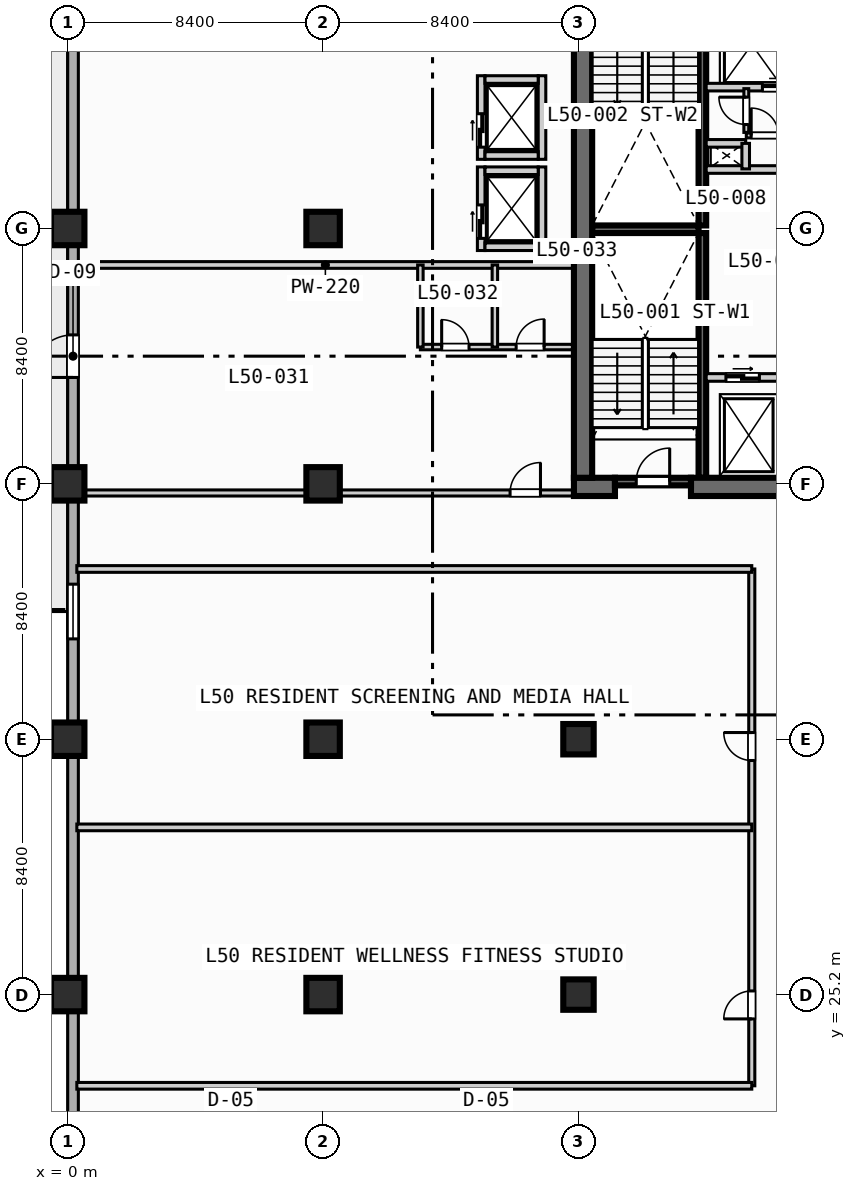
"""IFC4 building model, lengths in metres.
Left out: names, types, materials, properties, quantities, classifications, styles, units other than length and angle.
Written with IfcOpenShell. Run it as: python <this file> out.ifc"""

import sys

from ifc_helpers import new_model, si_unit, direction, frame, frame_2d, origin, origin_2d, place, context, subcontext, project, spatial, rectangle, extrude, element, fill, save


model = new_model("IFC4")
c1 = context("Model", 3, precision=1e-05, world=origin(), true_north=direction((0.0, 1.0)))
c2 = subcontext(c1, "Body", "Model", "MODEL_VIEW")
j1 = project(units=[si_unit("LENGTHUNIT", "METRE"), si_unit("PLANEANGLEUNIT", "RADIAN")], contexts=[c1])
p1 = place(None, origin())
s1 = spatial("IfcSite", under=j1, at=p1, CompositionType="ELEMENT")
p2 = place(p1, origin())
s2 = spatial("IfcBuilding", under=s1, at=p2, CompositionType="ELEMENT")
p3 = place(p2, frame((0.0, 0.0, 205.0)))
s3 = spatial("IfcBuildingStorey", under=s2, at=p3, CompositionType="ELEMENT", Elevation=205.0)
for number, where, z_axis, x_axis in (
    (1, (20.875, 42.2, 0.0), (0.0, 0.0, 1.0), (0.0, 1.0, 0.0)),
    (2, (20.875, 50.5, 0.0), (0.0, 0.0, 1.0), (0.0, 1.0, 0.0)),
):
    element("IfcWall", number, at=place(p3, frame(where, z_axis=z_axis, x_axis=x_axis)), inside=s3, PredefinedType="SOLIDWALL", context=c2, shape_type="SweptSolid", body=[
        extrude(rectangle(XDim=8.05, YDim=0.25, at=frame_2d((4.025, 0.0))), origin(), (0.0, 0.0, 1.0), 3.47),
    ])
p4 = place(p3, frame((17.25, 50.375, 0.0), z_axis=(0.0, 0.0, 1.0), x_axis=(1.0, 0.0, 0.0)))
e3 = element("IfcWall", 3, at=p4, inside=s3, PredefinedType="SOLIDWALL", context=c2, shape_type="SweptSolid", body=[
    extrude(rectangle(XDim=3.5, YDim=0.25, at=frame_2d((1.75, 0.0))), origin(), (0.0, 0.0, 1.0), 3.47),
])
p5 = place(p3, frame((16.65, 41.9, 0.0), z_axis=(0.0, 0.0, 1.0), x_axis=(1.0, 0.0, 0.0)))
e4 = element("IfcWall", 4, at=p5, inside=s3, PredefinedType="SHEAR", context=c2, shape_type="SweptSolid", body=[
    extrude(rectangle(XDim=1.35, YDim=0.6, at=frame_2d((0.675, 0.0))), origin(), (0.0, 0.0, 1.0), 3.47),
])
p6 = place(p3, frame((20.5, 41.9, 0.0), z_axis=(0.0, 0.0, 1.0), x_axis=(1.0, 0.0, 0.0)))
e5 = element("IfcWall", 5, at=p6, inside=s3, PredefinedType="SHEAR", context=c2, shape_type="SweptSolid", body=[
    extrude(rectangle(XDim=5.0, YDim=0.6, at=frame_2d((2.5, 0.0))), origin(), (0.0, 0.0, 1.0), 3.47),
])
p7 = place(p3, frame((16.95, 42.2, 0.0), z_axis=(0.0, 0.0, 1.0), x_axis=(0.0, 1.0, 0.0)))
e6 = element("IfcWall", 6, at=p7, inside=s3, PredefinedType="SHEAR", context=c2, shape_type="SweptSolid", body=[
    extrude(rectangle(XDim=16.35, YDim=0.6, at=frame_2d((8.175, 0.0))), origin(), (0.0, 0.0, 1.0), 3.47),
])
for number, where, z_axis, x_axis in (
    (7, (0.0, 25.2, 0.0), (0.0, 0.0, 1.0), (1.0, 0.0, 0.0)),
    (8, (0.0, 33.6, 0.0), (0.0, 0.0, 1.0), (1.0, 0.0, 0.0)),
    (9, (0.0, 42.0, 0.0), (0.0, 0.0, 1.0), (1.0, 0.0, 0.0)),
    (10, (0.0, 50.4, 0.0), (0.0, 0.0, 1.0), (1.0, 0.0, 0.0)),
    (11, (8.4, 25.2, 0.0), (0.0, 0.0, 1.0), (1.0, 0.0, 0.0)),
    (12, (8.4, 33.6, 0.0), (0.0, 0.0, 1.0), (1.0, 0.0, 0.0)),
    (13, (8.4, 42.0, 0.0), (0.0, 0.0, 1.0), (1.0, 0.0, 0.0)),
    (14, (8.4, 50.4, 0.0), (0.0, 0.0, 1.0), (1.0, 0.0, 0.0)),
):
    element("IfcColumn", number, at=place(p3, frame(where, z_axis=z_axis, x_axis=x_axis)), inside=s3, PredefinedType="COLUMN", context=c2, shape_type="SweptSolid", body=[
        extrude(rectangle(XDim=1.1, YDim=1.1, at=origin_2d()), origin(), (0.0, 0.0, 1.0), 3.7),
    ])
for number, where, z_axis, x_axis in (
    (15, (16.8, 25.2, 0.0), (0.0, 0.0, 1.0), (1.0, 0.0, 0.0)),
    (16, (16.8, 33.6, 0.0), (0.0, 0.0, 1.0), (1.0, 0.0, 0.0)),
):
    element("IfcColumn", number, at=place(p3, frame(where, z_axis=z_axis, x_axis=x_axis)), inside=s3, PredefinedType="COLUMN", context=c2, shape_type="SweptSolid", body=[
        extrude(rectangle(XDim=1.0, YDim=1.0, at=origin_2d()), origin(), (0.0, 0.0, 1.0), 3.7),
    ])
p8 = place(p3, frame((0.175, 3.175, 0.0), z_axis=(0.0, 0.0, 1.0), x_axis=(0.0, 1.0, 0.0)))
e17 = element("IfcWall", 17, at=p8, inside=s3, PredefinedType="STANDARD", context=c2, shape_type="SweptSolid", body=[
    extrude(rectangle(XDim=69.25, YDim=0.35, at=frame_2d((34.625, 0.0))), origin(), (0.0, 0.0, 1.0), 3.47),
])
p9 = place(p8, frame((42.325, 0.0, 0.0)))
e18 = element("IfcOpeningElement", 18, at=p9, cuts=e17, PredefinedType="OPENING", context=c2, shape_type="SweptSolid", body=[
    extrude(rectangle(XDim=1.4, YDim=2.2, at=frame_2d((0.7, 1.1))), frame((0.0, 0.185, 0.0), z_axis=(0.0, -1.0, 0.0), x_axis=(1.0, 0.0, 0.0)), (0.0, 0.0, 1.0), 0.37),
])
p10 = place(p8, frame((33.725, 0.0, 0.85)))
e19 = element("IfcOpeningElement", 19, at=p10, cuts=e17, PredefinedType="OPENING", context=c2, shape_type="SweptSolid", body=[
    extrude(rectangle(XDim=1.8, YDim=1.8, at=frame_2d((0.9, 0.9))), frame((0.0, 0.185, 0.0), z_axis=(0.0, -1.0, 0.0), x_axis=(1.0, 0.0, 0.0)), (0.0, 0.0, 1.0), 0.37),
])
p11 = place(p3, frame((18.0, 42.075, 0.0), z_axis=(0.0, 0.0, 1.0), x_axis=(1.0, 0.0, 0.0)))
e20 = element("IfcWall", 20, at=p11, inside=s3, PredefinedType="SOLIDWALL", context=c2, shape_type="SweptSolid", body=[
    extrude(rectangle(XDim=2.5, YDim=0.25, at=frame_2d((1.25, 0.0))), origin(), (0.0, 0.0, 1.0), 3.47),
])
p12 = place(p11, frame((0.7, 0.0, 0.0)))
e21 = element("IfcOpeningElement", 21, at=p12, cuts=e20, PredefinedType="OPENING", context=c2, shape_type="SweptSolid", body=[
    extrude(rectangle(XDim=1.1, YDim=2.15, at=frame_2d((0.55, 1.075))), frame((0.0, 0.135, 0.0), z_axis=(0.0, -1.0, 0.0), x_axis=(1.0, 0.0, 0.0)), (0.0, 0.0, 1.0), 0.27),
])
p13 = place(p3, frame((21.0, 45.5, 0.0), z_axis=(0.0, 0.0, 1.0), x_axis=(1.0, 0.0, 0.0)))
e22 = element("IfcWall", 22, at=p13, inside=s3, PredefinedType="SOLIDWALL", context=c2, shape_type="SweptSolid", body=[
    extrude(rectangle(XDim=4.15, YDim=0.25, at=frame_2d((2.075, 0.0))), origin(), (0.0, 0.0, 1.0), 3.47),
])
p14 = place(p13, frame((0.65, 0.0, 0.0)))
e23 = element("IfcOpeningElement", 23, at=p14, cuts=e22, PredefinedType="OPENING", context=c2, shape_type="SweptSolid", body=[
    extrude(rectangle(XDim=1.1, YDim=2.15, at=frame_2d((0.55, 1.075))), frame((0.0, 0.135, 0.0), z_axis=(0.0, -1.0, 0.0), x_axis=(1.0, 0.0, 0.0)), (0.0, 0.0, 1.0), 0.27),
])
p15 = place(p3, frame((21.0, 52.34, 0.0), z_axis=(0.0, 0.0, 1.0), x_axis=(1.0, 0.0, 0.0)))
e24 = element("IfcWall", 24, at=p15, inside=s3, PredefinedType="SOLIDWALL", context=c2, shape_type="SweptSolid", body=[
    extrude(rectangle(XDim=3.9, YDim=0.25, at=frame_2d((1.95, 0.0))), origin(), (0.0, 0.0, 1.0), 3.47),
])
p16 = place(p3, frame((21.0, 55.05, 0.0), z_axis=(0.0, 0.0, 1.0), x_axis=(1.0, 0.0, 0.0)))
e25 = element("IfcWall", 25, at=p16, inside=s3, PredefinedType="SOLIDWALL", context=c2, shape_type="SweptSolid", body=[
    extrude(rectangle(XDim=4.15, YDim=0.25, at=frame_2d((2.075, 0.0))), origin(), (0.0, 0.0, 1.0), 3.47),
])
p17 = place(p16, frame((1.85, 0.0, 0.0)))
e26 = element("IfcOpeningElement", 26, at=p17, cuts=e25, PredefinedType="OPENING", context=c2, shape_type="SweptSolid", body=[
    extrude(rectangle(XDim=1.1, YDim=2.15, at=frame_2d((0.55, 1.075))), frame((0.0, 0.135, 0.0), z_axis=(0.0, -1.0, 0.0), x_axis=(1.0, 0.0, 0.0)), (0.0, 0.0, 1.0), 0.27),
])
p18 = place(p3, frame((21.0, 53.2, 0.0), z_axis=(0.0, 0.0, 1.0), x_axis=(1.0, 0.0, 0.0)))
e27 = element("IfcWall", 27, at=p18, inside=s3, PredefinedType="SOLIDWALL", context=c2, shape_type="SweptSolid", body=[
    extrude(rectangle(XDim=1.3, YDim=0.25, at=frame_2d((0.65, 0.0))), origin(), (0.0, 0.0, 1.0), 3.47),
])
p19 = place(p3, frame((22.3, 52.36, 0.0), z_axis=(0.0, 0.0, 1.0), x_axis=(0.0, 1.0, 0.0)))
e28 = element("IfcWall", 28, at=p19, inside=s3, PredefinedType="SOLIDWALL", context=c2, shape_type="SweptSolid", body=[
    extrude(rectangle(XDim=0.84, YDim=0.25, at=frame_2d((0.42, 0.0))), origin(), (0.0, 0.0, 1.0), 3.47),
])
p20 = place(p3, frame((22.32, 53.56, 0.0), z_axis=(0.0, 0.0, 1.0), x_axis=(0.0, 1.0, 0.0)))
e29 = element("IfcWall", 29, at=p20, inside=s3, PredefinedType="PARTITIONING", context=c2, shape_type="SweptSolid", body=[
    extrude(rectangle(XDim=1.44, YDim=0.16, at=frame_2d((0.72, 0.0))), origin(), (0.0, 0.0, 1.0), 3.47),
])
p21 = place(p20, frame((0.26, 0.0, 0.0)))
e30 = element("IfcOpeningElement", 30, at=p21, cuts=e29, PredefinedType="OPENING", context=c2, shape_type="SweptSolid", body=[
    extrude(rectangle(XDim=0.9, YDim=2.1, at=frame_2d((0.45, 1.05))), frame((0.0, 0.09, 0.0), z_axis=(0.0, -1.0, 0.0), x_axis=(1.0, 0.0, 0.0)), (0.0, 0.0, 1.0), 0.18),
])
p22 = place(p3, frame((22.32, 53.46, 0.0), z_axis=(0.0, 0.0, 1.0), x_axis=(1.0, 0.0, 0.0)))
e31 = element("IfcWall", 31, at=p22, inside=s3, PredefinedType="PARTITIONING", context=c2, shape_type="SweptSolid", body=[
    extrude(rectangle(XDim=2.36, YDim=0.16, at=frame_2d((1.18, 0.0))), origin(), (0.0, 0.0, 1.0), 3.47),
])
p23 = place(p22, frame((0.16, 0.0, 0.0)))
e32 = element("IfcOpeningElement", 32, at=p23, cuts=e31, PredefinedType="OPENING", context=c2, shape_type="SweptSolid", body=[
    extrude(rectangle(XDim=0.9, YDim=2.1, at=frame_2d((0.45, 1.05))), frame((0.0, 0.09, 0.0), z_axis=(0.0, -1.0, 0.0), x_axis=(1.0, 0.0, 0.0)), (0.0, 0.0, 1.0), 0.18),
])
p24 = place(p3, frame((13.6, 49.675, 0.0), z_axis=(0.0, 0.0, 1.0), x_axis=(0.0, 1.0, 0.0)))
e33 = element("IfcWall", 33, at=p24, inside=s3, PredefinedType="SOLIDWALL", context=c2, shape_type="SweptSolid", body=[
    extrude(rectangle(XDim=2.75, YDim=0.25, at=frame_2d((1.375, 0.0))), origin(), (0.0, 0.0, 1.0), 3.47),
])
p25 = place(p24, frame((0.4, 0.0, 0.0)))
e34 = element("IfcOpeningElement", 34, at=p25, cuts=e33, PredefinedType="OPENING", context=c2, shape_type="SweptSolid", body=[
    extrude(rectangle(XDim=1.1, YDim=2.15, at=frame_2d((0.55, 1.075))), frame((0.0, 0.135, 0.0), z_axis=(0.0, -1.0, 0.0), x_axis=(1.0, 0.0, 0.0)), (0.0, 0.0, 1.0), 0.27),
])
p26 = place(p3, frame((15.6, 49.675, 0.0), z_axis=(0.0, 0.0, 1.0), x_axis=(0.0, 1.0, 0.0)))
e35 = element("IfcWall", 35, at=p26, inside=s3, PredefinedType="SOLIDWALL", context=c2, shape_type="SweptSolid", body=[
    extrude(rectangle(XDim=2.75, YDim=0.25, at=frame_2d((1.375, 0.0))), origin(), (0.0, 0.0, 1.0), 3.47),
])
for number, where, z_axis, x_axis in (
    (36, (13.725, 49.8, 0.0), (0.0, 0.0, 1.0), (1.0, 0.0, 0.0)),
    (37, (13.725, 52.3, 0.0), (0.0, 0.0, 1.0), (1.0, 0.0, 0.0)),
):
    element("IfcWall", number, at=place(p3, frame(where, z_axis=z_axis, x_axis=x_axis)), inside=s3, PredefinedType="SOLIDWALL", context=c2, shape_type="SweptSolid", body=[
        extrude(rectangle(XDim=1.75, YDim=0.25, at=frame_2d((0.875, 0.0))), origin(), (0.0, 0.0, 1.0), 3.47),
    ])
p27 = place(p3, frame((13.6, 52.675, 0.0), z_axis=(0.0, 0.0, 1.0), x_axis=(0.0, 1.0, 0.0)))
e38 = element("IfcWall", 38, at=p27, inside=s3, PredefinedType="SOLIDWALL", context=c2, shape_type="SweptSolid", body=[
    extrude(rectangle(XDim=2.75, YDim=0.25, at=frame_2d((1.375, 0.0))), origin(), (0.0, 0.0, 1.0), 3.47),
])
p28 = place(p27, frame((0.4, 0.0, 0.0)))
e39 = element("IfcOpeningElement", 39, at=p28, cuts=e38, PredefinedType="OPENING", context=c2, shape_type="SweptSolid", body=[
    extrude(rectangle(XDim=1.1, YDim=2.15, at=frame_2d((0.55, 1.075))), frame((0.0, 0.135, 0.0), z_axis=(0.0, -1.0, 0.0), x_axis=(1.0, 0.0, 0.0)), (0.0, 0.0, 1.0), 0.27),
])
p29 = place(p3, frame((15.6, 52.675, 0.0), z_axis=(0.0, 0.0, 1.0), x_axis=(0.0, 1.0, 0.0)))
e40 = element("IfcWall", 40, at=p29, inside=s3, PredefinedType="SOLIDWALL", context=c2, shape_type="SweptSolid", body=[
    extrude(rectangle(XDim=2.75, YDim=0.25, at=frame_2d((1.375, 0.0))), origin(), (0.0, 0.0, 1.0), 3.47),
])
for number, where, z_axis, x_axis in (
    (41, (13.725, 52.8, 0.0), (0.0, 0.0, 1.0), (1.0, 0.0, 0.0)),
    (42, (13.725, 55.3, 0.0), (0.0, 0.0, 1.0), (1.0, 0.0, 0.0)),
):
    element("IfcWall", number, at=place(p3, frame(where, z_axis=z_axis, x_axis=x_axis)), inside=s3, PredefinedType="SOLIDWALL", context=c2, shape_type="SweptSolid", body=[
        extrude(rectangle(XDim=1.75, YDim=0.25, at=frame_2d((0.875, 0.0))), origin(), (0.0, 0.0, 1.0), 3.47),
    ])
p30 = place(p3, frame((0.35, 41.7, 0.0), z_axis=(0.0, 0.0, 1.0), x_axis=(1.0, 0.0, 0.0)))
e43 = element("IfcWall", 43, at=p30, inside=s3, PredefinedType="PARTITIONING", context=c2, shape_type="SweptSolid", body=[
    extrude(rectangle(XDim=16.25, YDim=0.2, at=frame_2d((8.125, 0.0))), origin(), (0.0, 0.0, 1.0), 2.82),
])
p31 = place(p30, frame((14.2, 0.0, 0.0)))
e44 = element("IfcOpeningElement", 44, at=p31, cuts=e43, PredefinedType="OPENING", context=c2, shape_type="SweptSolid", body=[
    extrude(rectangle(XDim=1.0, YDim=2.15, at=frame_2d((0.5, 1.075))), frame((0.0, 0.11, 0.0), z_axis=(0.0, -1.0, 0.0), x_axis=(1.0, 0.0, 0.0)), (0.0, 0.0, 1.0), 0.22),
])
p32 = place(p3, frame((0.35, 49.2, 0.0), z_axis=(0.0, 0.0, 1.0), x_axis=(1.0, 0.0, 0.0)))
e45 = element("IfcWall", 45, at=p32, inside=s3, PredefinedType="PARTITIONING", context=c2, shape_type="SweptSolid", body=[
    extrude(rectangle(XDim=16.25, YDim=0.22, at=frame_2d((8.125, 0.0))), origin(), (0.0, 0.0, 1.0), 3.47),
])
p33 = place(p3, frame((11.6, 46.5, 0.0), z_axis=(0.0, 0.0, 1.0), x_axis=(1.0, 0.0, 0.0)))
e46 = element("IfcWall", 46, at=p33, inside=s3, PredefinedType="PLUMBINGWALL", context=c2, shape_type="SweptSolid", body=[
    extrude(rectangle(XDim=5.0, YDim=0.18, at=frame_2d((2.5, 0.0))), origin(), (0.0, 0.0, 1.0), 3.47),
])
p34 = place(p33, frame((0.7, 0.0, 0.0)))
e47 = element("IfcOpeningElement", 47, at=p34, cuts=e46, PredefinedType="OPENING", context=c2, shape_type="SweptSolid", body=[
    extrude(rectangle(XDim=0.9, YDim=2.1, at=frame_2d((0.45, 1.05))), frame((0.0, 0.1, 0.0), z_axis=(0.0, -1.0, 0.0), x_axis=(1.0, 0.0, 0.0)), (0.0, 0.0, 1.0), 0.2),
])
p35 = place(p33, frame((3.15, 0.0, 0.0)))
e48 = element("IfcOpeningElement", 48, at=p35, cuts=e46, PredefinedType="OPENING", context=c2, shape_type="SweptSolid", body=[
    extrude(rectangle(XDim=0.92, YDim=2.1, at=frame_2d((0.46, 1.05))), frame((0.0, 0.1, 0.0), z_axis=(0.0, -1.0, 0.0), x_axis=(1.0, 0.0, 0.0)), (0.0, 0.0, 1.0), 0.2),
])
for number, where, z_axis, x_axis in (
    (49, (11.6, 46.5, 0.0), (0.0, 0.0, 1.0), (0.0, 1.0, 0.0)),
    (50, (14.05, 46.5, 0.0), (0.0, 0.0, 1.0), (0.0, 1.0, 0.0)),
):
    element("IfcWall", number, at=place(p3, frame(where, z_axis=z_axis, x_axis=x_axis)), inside=s3, PredefinedType="PLUMBINGWALL", context=c2, shape_type="SweptSolid", body=[
        extrude(rectangle(XDim=2.7, YDim=0.18, at=frame_2d((1.35, 0.0))), origin(), (0.0, 0.0, 1.0), 3.47),
    ])
p36 = place(p3, frame((22.5, 22.2, 0.0), z_axis=(0.0, 0.0, 1.0), x_axis=(0.0, 1.0, 0.0)))
e51 = element("IfcWall", 51, at=p36, inside=s3, PredefinedType="PARTITIONING", context=c2, shape_type="SweptSolid", body=[
    extrude(rectangle(XDim=17.0, YDim=0.2, at=frame_2d((8.5, 0.0))), origin(), (0.0, 0.0, 1.0), 3.47),
])
p37 = place(p36, frame((2.2, 0.0, 0.0)))
e52 = element("IfcOpeningElement", 52, at=p37, cuts=e51, PredefinedType="OPENING", context=c2, shape_type="SweptSolid", body=[
    extrude(rectangle(XDim=0.92, YDim=2.1, at=frame_2d((0.46, 1.05))), frame((0.0, 0.11, 0.0), z_axis=(0.0, -1.0, 0.0), x_axis=(1.0, 0.0, 0.0)), (0.0, 0.0, 1.0), 0.22),
])
p38 = place(p36, frame((10.7, 0.0, 0.0)))
e53 = element("IfcOpeningElement", 53, at=p38, cuts=e51, PredefinedType="OPENING", context=c2, shape_type="SweptSolid", body=[
    extrude(rectangle(XDim=0.92, YDim=2.1, at=frame_2d((0.46, 1.05))), frame((0.0, 0.11, 0.0), z_axis=(0.0, -1.0, 0.0), x_axis=(1.0, 0.0, 0.0)), (0.0, 0.0, 1.0), 0.22),
])
for number, where, z_axis, x_axis in (
    (54, (0.3, 22.2, 0.0), (0.0, 0.0, 1.0), (1.0, 0.0, 0.0)),
    (55, (0.3, 30.7, 0.0), (0.0, 0.0, 1.0), (1.0, 0.0, 0.0)),
    (56, (0.3, 39.2, 0.0), (0.0, 0.0, 1.0), (1.0, 0.0, 0.0)),
):
    element("IfcWall", number, at=place(p3, frame(where, z_axis=z_axis, x_axis=x_axis)), inside=s3, PredefinedType="PARTITIONING", context=c2, shape_type="SweptSolid", body=[
        extrude(rectangle(XDim=22.2, YDim=0.22, at=frame_2d((11.1, 0.0))), origin(), (0.0, 0.0, 1.0), 3.47),
    ])
p39 = place(p9, origin())
e57 = element("IfcDoor", 57, at=p39, inside=s3, OperationType="SINGLE_SWING_LEFT", PredefinedType="DOOR", context=c2, shape_type="SweptSolid", body=[
    extrude(rectangle(XDim=1.4, YDim=2.2, at=frame_2d((0.7, 1.1))), frame((0.0, 0.025, 0.0), z_axis=(0.0, -1.0, 0.0), x_axis=(1.0, 0.0, 0.0)), (0.0, 0.0, 1.0), 0.05),
])
fill(e18, e57)
p40 = place(p10, origin())
e58 = element("IfcWindow", 58, at=p40, inside=s3, PartitioningType="SINGLE_PANEL", PredefinedType="WINDOW", context=c2, shape_type="SweptSolid", body=[
    extrude(rectangle(XDim=1.8, YDim=1.8, at=frame_2d((0.9, 0.9))), frame((0.0, 0.03, 0.0), z_axis=(0.0, -1.0, 0.0), x_axis=(1.0, 0.0, 0.0)), (0.0, 0.0, 1.0), 0.06),
])
fill(e19, e58)
p41 = place(p12, origin())
e59 = element("IfcDoor", 59, at=p41, inside=s3, OperationType="SINGLE_SWING_RIGHT", PredefinedType="DOOR", context=c2, shape_type="SweptSolid", body=[
    extrude(rectangle(XDim=1.1, YDim=2.15, at=frame_2d((0.55, 1.075))), frame((0.0, 0.025, 0.0), z_axis=(0.0, -1.0, 0.0), x_axis=(1.0, 0.0, 0.0)), (0.0, 0.0, 1.0), 0.05),
])
fill(e21, e59)
p42 = place(p14, origin())
e60 = element("IfcDoor", 60, at=p42, inside=s3, OperationType="SLIDING_TO_LEFT", PredefinedType="DOOR", context=c2, shape_type="SweptSolid", body=[
    extrude(rectangle(XDim=1.1, YDim=2.15, at=frame_2d((0.55, 1.075))), frame((0.0, 0.025, 0.0), z_axis=(0.0, -1.0, 0.0), x_axis=(1.0, 0.0, 0.0)), (0.0, 0.0, 1.0), 0.05),
])
fill(e23, e60)
p43 = place(p17, origin())
e61 = element("IfcDoor", 61, at=p43, inside=s3, OperationType="SLIDING_TO_LEFT", PredefinedType="DOOR", context=c2, shape_type="SweptSolid", body=[
    extrude(rectangle(XDim=1.1, YDim=2.15, at=frame_2d((0.55, 1.075))), frame((0.0, 0.025, 0.0), z_axis=(0.0, -1.0, 0.0), x_axis=(1.0, 0.0, 0.0)), (0.0, 0.0, 1.0), 0.05),
])
fill(e26, e61)
p44 = place(p21, origin())
e62 = element("IfcDoor", 62, at=p44, inside=s3, OperationType="SINGLE_SWING_RIGHT", PredefinedType="DOOR", context=c2, shape_type="SweptSolid", body=[
    extrude(rectangle(XDim=0.9, YDim=2.1, at=frame_2d((0.45, 1.05))), frame((0.0, 0.025, 0.0), z_axis=(0.0, -1.0, 0.0), x_axis=(1.0, 0.0, 0.0)), (0.0, 0.0, 1.0), 0.05),
])
fill(e30, e62)
p45 = place(p23, origin())
e63 = element("IfcDoor", 63, at=p45, inside=s3, OperationType="SINGLE_SWING_LEFT", PredefinedType="DOOR", context=c2, shape_type="SweptSolid", body=[
    extrude(rectangle(XDim=0.9, YDim=2.1, at=frame_2d((0.45, 1.05))), frame((0.0, 0.025, 0.0), z_axis=(0.0, -1.0, 0.0), x_axis=(1.0, 0.0, 0.0)), (0.0, 0.0, 1.0), 0.05),
])
fill(e32, e63)
p46 = place(p25, origin())
e64 = element("IfcDoor", 64, at=p46, inside=s3, OperationType="SLIDING_TO_LEFT", PredefinedType="DOOR", context=c2, shape_type="SweptSolid", body=[
    extrude(rectangle(XDim=1.1, YDim=2.15, at=frame_2d((0.55, 1.075))), frame((0.0, 0.025, 0.0), z_axis=(0.0, -1.0, 0.0), x_axis=(1.0, 0.0, 0.0)), (0.0, 0.0, 1.0), 0.05),
])
fill(e34, e64)
p47 = place(p28, origin())
e65 = element("IfcDoor", 65, at=p47, inside=s3, OperationType="SLIDING_TO_LEFT", PredefinedType="DOOR", context=c2, shape_type="SweptSolid", body=[
    extrude(rectangle(XDim=1.1, YDim=2.15, at=frame_2d((0.55, 1.075))), frame((0.0, 0.025, 0.0), z_axis=(0.0, -1.0, 0.0), x_axis=(1.0, 0.0, 0.0)), (0.0, 0.0, 1.0), 0.05),
])
fill(e39, e65)
p48 = place(p31, origin())
e66 = element("IfcDoor", 66, at=p48, inside=s3, OperationType="SINGLE_SWING_RIGHT", PredefinedType="DOOR", context=c2, shape_type="SweptSolid", body=[
    extrude(rectangle(XDim=1.0, YDim=2.15, at=frame_2d((0.5, 1.075))), frame((0.0, 0.025, 0.0), z_axis=(0.0, -1.0, 0.0), x_axis=(1.0, 0.0, 0.0)), (0.0, 0.0, 1.0), 0.05),
])
fill(e44, e66)
p49 = place(p34, origin())
e67 = element("IfcDoor", 67, at=p49, inside=s3, OperationType="SINGLE_SWING_LEFT", PredefinedType="DOOR", context=c2, shape_type="SweptSolid", body=[
    extrude(rectangle(XDim=0.9, YDim=2.1, at=frame_2d((0.45, 1.05))), frame((0.0, 0.025, 0.0), z_axis=(0.0, -1.0, 0.0), x_axis=(1.0, 0.0, 0.0)), (0.0, 0.0, 1.0), 0.05),
])
fill(e47, e67)
p50 = place(p35, origin())
e68 = element("IfcDoor", 68, at=p50, inside=s3, OperationType="SINGLE_SWING_RIGHT", PredefinedType="DOOR", context=c2, shape_type="SweptSolid", body=[
    extrude(rectangle(XDim=0.92, YDim=2.1, at=frame_2d((0.46, 1.05))), frame((0.0, 0.025, 0.0), z_axis=(0.0, -1.0, 0.0), x_axis=(1.0, 0.0, 0.0)), (0.0, 0.0, 1.0), 0.05),
])
fill(e48, e68)
p51 = place(p37, origin())
e69 = element("IfcDoor", 69, at=p51, inside=s3, OperationType="SINGLE_SWING_LEFT", PredefinedType="DOOR", context=c2, shape_type="SweptSolid", body=[
    extrude(rectangle(XDim=0.92, YDim=2.1, at=frame_2d((0.46, 1.05))), frame((0.0, 0.025, 0.0), z_axis=(0.0, -1.0, 0.0), x_axis=(1.0, 0.0, 0.0)), (0.0, 0.0, 1.0), 0.05),
])
fill(e52, e69)
p52 = place(p38, origin())
e70 = element("IfcDoor", 70, at=p52, inside=s3, OperationType="SINGLE_SWING_RIGHT", PredefinedType="DOOR", context=c2, shape_type="SweptSolid", body=[
    extrude(rectangle(XDim=0.92, YDim=2.1, at=frame_2d((0.46, 1.05))), frame((0.0, 0.025, 0.0), z_axis=(0.0, -1.0, 0.0), x_axis=(1.0, 0.0, 0.0)), (0.0, 0.0, 1.0), 0.05),
])
fill(e53, e70)
save(model, sys.argv[1])
